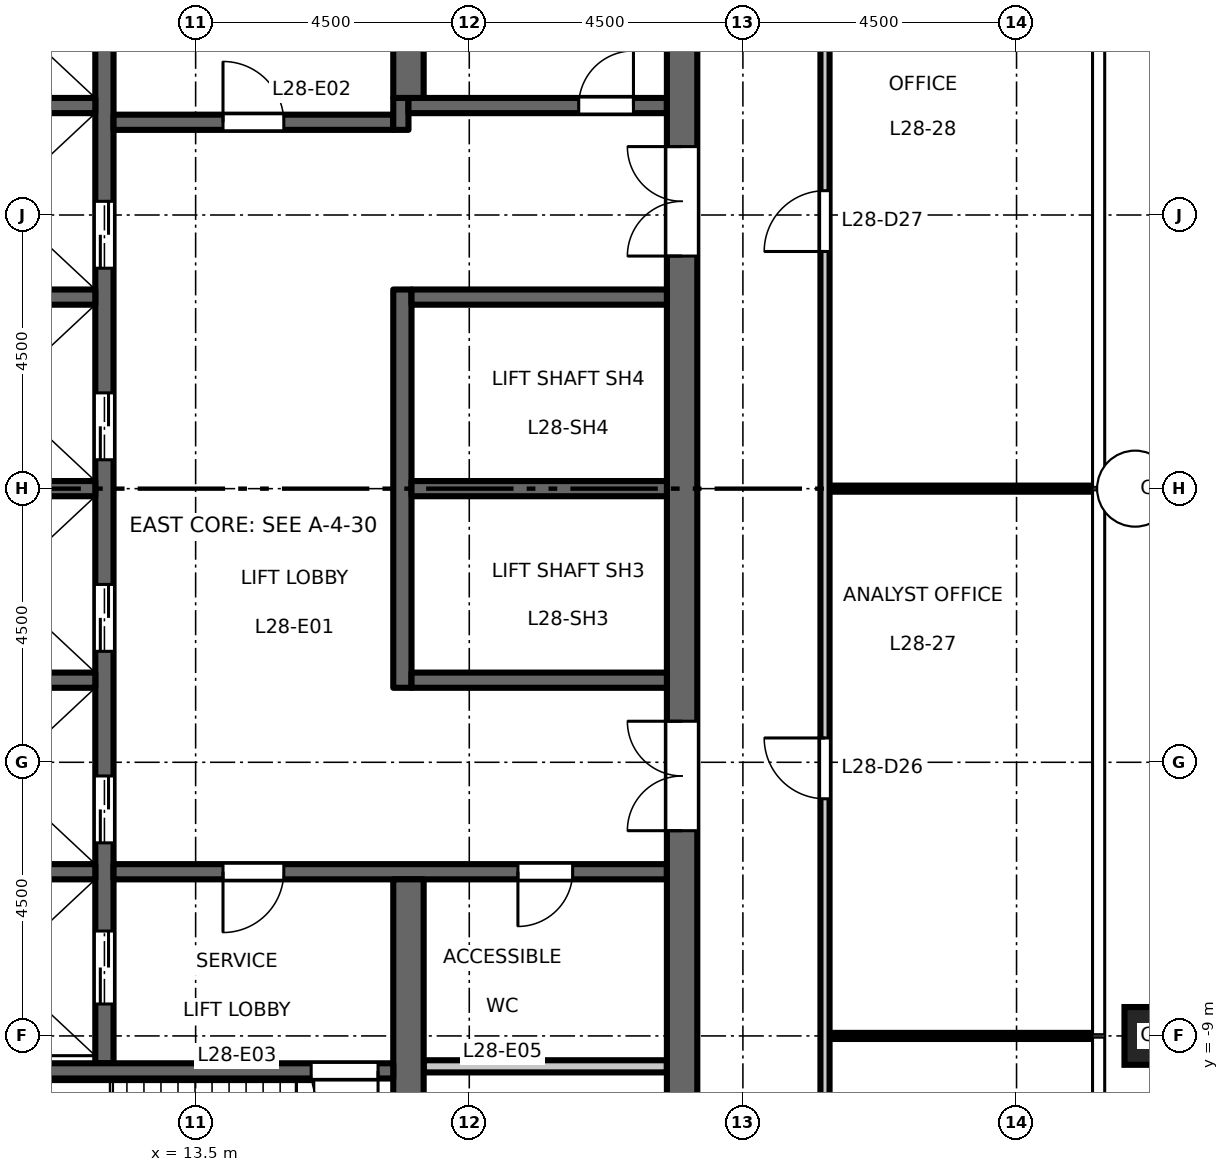
"""IFC4 building model, lengths in metres.
Left out: names, types, materials, properties, quantities, classifications, styles, units other than length and angle.
Written with IfcOpenShell. Run it as: python <this file> out.ifc"""

import sys

from ifc_helpers import new_model, si_unit, direction, frame, frame_2d, origin, origin_2d, place, context, subcontext, project, spatial, rectangle, hollow_rectangle, extrude, element, fill, save


model = new_model("IFC4")
c1 = context("Model", 3, precision=1e-05, world=origin(), true_north=direction((0.0, 1.0)))
c2 = subcontext(c1, "Body", "Model", "MODEL_VIEW")
j1 = project(units=[si_unit("LENGTHUNIT", "METRE"), si_unit("PLANEANGLEUNIT", "RADIAN")], contexts=[c1])
p1 = place(None, origin())
s1 = spatial("IfcSite", under=j1, at=p1, CompositionType="ELEMENT")
p2 = place(p1, origin())
s2 = spatial("IfcBuilding", under=s1, at=p2, CompositionType="ELEMENT")
p3 = place(p2, frame((0.0, 0.0, 131.7)))
s3 = spatial("IfcBuildingStorey", under=s2, at=p3, CompositionType="ELEMENT", Elevation=131.7)
for number, where, z_axis, x_axis in (
    (1, (29.25, -9.0, 0.0), (0.0, 0.0, 1.0), (1.0, 0.0, 0.0)),
    (2, (29.25, 0.0, 0.0), (0.0, 0.0, 1.0), (1.0, 0.0, 0.0)),
):
    element("IfcColumn", number, at=place(p3, frame(where, z_axis=z_axis, x_axis=x_axis)), inside=s3, PredefinedType="COLUMN", context=c2, shape_type="SweptSolid", body=[
        extrude(hollow_rectangle(XDim=0.95, YDim=0.95, WallThickness=0.055, at=origin_2d()), origin(), (0.0, 0.0, 1.0), 4.5),
    ])
p4 = place(p3, frame((12.0, -9.45, 0.0), z_axis=(0.0, 0.0, 1.0), x_axis=(0.0, 1.0, 0.0)))
e3 = element("IfcWall", 3, at=p4, inside=s3, PredefinedType="SHEAR", context=c2, shape_type="SweptSolid", body=[
    extrude(rectangle(XDim=18.9, YDim=0.3, at=frame_2d((9.45, 0.0))), origin(), (0.0, 0.0, 1.0), 4.35),
])
p5 = place(p4, frame((3.625, 0.0, 0.0)))
e4 = element("IfcOpeningElement", 4, at=p5, cuts=e3, PredefinedType="OPENING", context=c2, shape_type="SweptSolid", body=[
    extrude(rectangle(XDim=1.1, YDim=2.1, at=frame_2d((0.55, 1.05))), frame((0.0, 0.16, 0.0), z_axis=(0.0, -1.0, 0.0), x_axis=(1.0, 0.0, 0.0)), (0.0, 0.0, 1.0), 0.32),
])
p6 = place(p4, frame((6.775, 0.0, 0.0)))
e5 = element("IfcOpeningElement", 5, at=p6, cuts=e3, PredefinedType="OPENING", context=c2, shape_type="SweptSolid", body=[
    extrude(rectangle(XDim=1.1, YDim=2.1, at=frame_2d((0.55, 1.05))), frame((0.0, 0.16, 0.0), z_axis=(0.0, -1.0, 0.0), x_axis=(1.0, 0.0, 0.0)), (0.0, 0.0, 1.0), 0.32),
])
p7 = place(p4, frame((9.925, 0.0, 0.0)))
e6 = element("IfcOpeningElement", 6, at=p7, cuts=e3, PredefinedType="OPENING", context=c2, shape_type="SweptSolid", body=[
    extrude(rectangle(XDim=1.1, YDim=2.1, at=frame_2d((0.55, 1.05))), frame((0.0, 0.16, 0.0), z_axis=(0.0, -1.0, 0.0), x_axis=(1.0, 0.0, 0.0)), (0.0, 0.0, 1.0), 0.32),
])
p8 = place(p4, frame((13.075, 0.0, 0.0)))
e7 = element("IfcOpeningElement", 7, at=p8, cuts=e3, PredefinedType="OPENING", context=c2, shape_type="SweptSolid", body=[
    extrude(rectangle(XDim=1.1, YDim=2.1, at=frame_2d((0.55, 1.05))), frame((0.0, 0.16, 0.0), z_axis=(0.0, -1.0, 0.0), x_axis=(1.0, 0.0, 0.0)), (0.0, 0.0, 1.0), 0.32),
])
p9 = place(p4, frame((16.725, 0.0, 0.0)))
e8 = element("IfcOpeningElement", 8, at=p9, cuts=e3, PredefinedType="OPENING", context=c2, shape_type="SweptSolid", body=[
    extrude(rectangle(XDim=1.2, YDim=2.1, at=frame_2d((0.6, 1.05))), frame((0.0, 0.16, 0.0), z_axis=(0.0, -1.0, 0.0), x_axis=(1.0, 0.0, 0.0)), (0.0, 0.0, 1.0), 0.32),
])
p10 = place(p4, frame((0.975, 0.0, 0.0)))
e9 = element("IfcOpeningElement", 9, at=p10, cuts=e3, PredefinedType="OPENING", context=c2, shape_type="SweptSolid", body=[
    extrude(rectangle(XDim=1.2, YDim=2.1, at=frame_2d((0.6, 1.05))), frame((0.0, 0.16, 0.0), z_axis=(0.0, -1.0, 0.0), x_axis=(1.0, 0.0, 0.0)), (0.0, 0.0, 1.0), 0.32),
])
p11 = place(p3, frame((12.15, 6.025, 0.0), z_axis=(0.0, 0.0, 1.0), x_axis=(1.0, 0.0, 0.0)))
e10 = element("IfcWall", 10, at=p11, inside=s3, PredefinedType="SHEAR", context=c2, shape_type="SweptSolid", body=[
    extrude(rectangle(XDim=4.6, YDim=0.25, at=frame_2d((2.3, 0.0))), origin(), (0.0, 0.0, 1.0), 4.35),
])
p12 = place(p11, frame((1.8, 0.0, 0.0)))
e11 = element("IfcOpeningElement", 11, at=p12, cuts=e10, PredefinedType="OPENING", context=c2, shape_type="SweptSolid", body=[
    extrude(rectangle(XDim=1.0, YDim=2.1, at=frame_2d((0.5, 1.05))), frame((0.0, 0.135, 0.0), z_axis=(0.0, -1.0, 0.0), x_axis=(1.0, 0.0, 0.0)), (0.0, 0.0, 1.0), 0.27),
])
p13 = place(p3, frame((16.875, 5.9, 0.0), z_axis=(0.0, 0.0, 1.0), x_axis=(0.0, 1.0, 0.0)))
e12 = element("IfcWall", 12, at=p13, inside=s3, PredefinedType="SHEAR", context=c2, shape_type="SweptSolid", body=[
    extrude(rectangle(XDim=0.525, YDim=0.25, at=frame_2d((0.263, 0.0))), origin(), (0.0, 0.0, 1.0), 4.35),
])
p14 = place(p3, frame((17.0, 6.3, 0.0), z_axis=(0.0, 0.0, 1.0), x_axis=(1.0, 0.0, 0.0)))
e13 = element("IfcWall", 13, at=p14, inside=s3, PredefinedType="SHEAR", context=c2, shape_type="SweptSolid", body=[
    extrude(rectangle(XDim=4.25, YDim=0.25, at=frame_2d((2.125, 0.0))), origin(), (0.0, 0.0, 1.0), 4.35),
])
p15 = place(p14, frame((2.8, 0.0, 0.0)))
e14 = element("IfcOpeningElement", 14, at=p15, cuts=e13, PredefinedType="OPENING", context=c2, shape_type="SweptSolid", body=[
    extrude(rectangle(XDim=0.9, YDim=2.1, at=frame_2d((0.45, 1.05))), frame((0.0, 0.135, 0.0), z_axis=(0.0, -1.0, 0.0), x_axis=(1.0, 0.0, 0.0)), (0.0, 0.0, 1.0), 0.27),
])
p16 = place(p3, frame((12.15, -6.3, 0.0), z_axis=(0.0, 0.0, 1.0), x_axis=(1.0, 0.0, 0.0)))
e15 = element("IfcWall", 15, at=p16, inside=s3, PredefinedType="SHEAR", context=c2, shape_type="SweptSolid", body=[
    extrude(rectangle(XDim=9.1, YDim=0.25, at=frame_2d((4.55, 0.0))), origin(), (0.0, 0.0, 1.0), 4.35),
])
p17 = place(p16, frame((1.8, 0.0, 0.0)))
e16 = element("IfcOpeningElement", 16, at=p17, cuts=e15, PredefinedType="OPENING", context=c2, shape_type="SweptSolid", body=[
    extrude(rectangle(XDim=1.0, YDim=2.1, at=frame_2d((0.5, 1.05))), frame((0.0, 0.135, 0.0), z_axis=(0.0, -1.0, 0.0), x_axis=(1.0, 0.0, 0.0)), (0.0, 0.0, 1.0), 0.27),
])
p18 = place(p16, frame((6.65, 0.0, 0.0)))
e17 = element("IfcOpeningElement", 17, at=p18, cuts=e15, PredefinedType="OPENING", context=c2, shape_type="SweptSolid", body=[
    extrude(rectangle(XDim=0.9, YDim=2.1, at=frame_2d((0.45, 1.05))), frame((0.0, 0.135, 0.0), z_axis=(0.0, -1.0, 0.0), x_axis=(1.0, 0.0, 0.0)), (0.0, 0.0, 1.0), 0.27),
])
p19 = place(p3, frame((21.5, -13.0, 0.0), z_axis=(0.0, 0.0, 1.0), x_axis=(0.0, 1.0, 0.0)))
e18 = element("IfcWall", 18, at=p19, inside=s3, PredefinedType="SHEAR", context=c2, shape_type="SweptSolid", body=[
    extrude(rectangle(XDim=26.0, YDim=0.5, at=frame_2d((13.0, 0.0))), origin(), (0.0, 0.0, 1.0), 4.35),
])
p20 = place(p19, frame((16.825, 0.0, 0.0)))
e19 = element("IfcOpeningElement", 19, at=p20, cuts=e18, PredefinedType="OPENING", context=c2, shape_type="SweptSolid", body=[
    extrude(rectangle(XDim=1.8, YDim=2.1, at=frame_2d((0.9, 1.05))), frame((0.0, 0.26, 0.0), z_axis=(0.0, -1.0, 0.0), x_axis=(1.0, 0.0, 0.0)), (0.0, 0.0, 1.0), 0.52),
])
p21 = place(p19, frame((7.375, 0.0, 0.0)))
e20 = element("IfcOpeningElement", 20, at=p21, cuts=e18, PredefinedType="OPENING", context=c2, shape_type="SweptSolid", body=[
    extrude(rectangle(XDim=1.8, YDim=2.1, at=frame_2d((0.9, 1.05))), frame((0.0, 0.26, 0.0), z_axis=(0.0, -1.0, 0.0), x_axis=(1.0, 0.0, 0.0)), (0.0, 0.0, 1.0), 0.52),
])
p22 = place(p19, frame((1.3, 0.0, 0.0)))
e21 = element("IfcOpeningElement", 21, at=p22, cuts=e18, PredefinedType="OPENING", context=c2, shape_type="SweptSolid", body=[
    extrude(rectangle(XDim=0.9, YDim=2.1, at=frame_2d((0.45, 1.05))), frame((0.0, 0.26, 0.0), z_axis=(0.0, -1.0, 0.0), x_axis=(1.0, 0.0, 0.0)), (0.0, 0.0, 1.0), 0.52),
])
p23 = place(p3, frame((17.25, -9.5, 0.0), z_axis=(0.0, 0.0, 1.0), x_axis=(1.0, 0.0, 0.0)))
e22 = element("IfcWall", 22, at=p23, inside=s3, PredefinedType="PARTITIONING", context=c2, shape_type="SweptSolid", body=[
    extrude(rectangle(XDim=4.0, YDim=0.2, at=frame_2d((2.0, 0.0))), origin(), (0.0, 0.0, 1.0), 4.35),
])
p24 = place(p3, frame((16.9, -3.275, 0.0), z_axis=(0.0, 0.0, 1.0), x_axis=(0.0, 1.0, 0.0)))
e23 = element("IfcWall", 23, at=p24, inside=s3, PredefinedType="SHEAR", context=c2, shape_type="SweptSolid", body=[
    extrude(rectangle(XDim=6.55, YDim=0.3, at=frame_2d((3.275, 0.0))), origin(), (0.0, 0.0, 1.0), 4.35),
])
for number, where, z_axis, x_axis in (
    (24, (17.05, 0.0, 0.0), (0.0, 0.0, 1.0), (1.0, 0.0, 0.0)),
    (25, (17.05, 3.15, 0.0), (0.0, 0.0, 1.0), (1.0, 0.0, 0.0)),
    (26, (17.05, -3.15, 0.0), (0.0, 0.0, 1.0), (1.0, 0.0, 0.0)),
):
    element("IfcWall", number, at=place(p3, frame(where, z_axis=z_axis, x_axis=x_axis)), inside=s3, PredefinedType="SHEAR", context=c2, shape_type="SweptSolid", body=[
        extrude(rectangle(XDim=4.2, YDim=0.25, at=frame_2d((2.1, 0.0))), origin(), (0.0, 0.0, 1.0), 4.35),
    ])
for number, where, z_axis, x_axis in (
    (27, (17.0, 6.425, 0.0), (0.0, 0.0, 1.0), (0.0, 1.0, 0.0)),
    (28, (17.0, -13.0, 0.0), (0.0, 0.0, 1.0), (0.0, 1.0, 0.0)),
):
    element("IfcWall", number, at=place(p3, frame(where, z_axis=z_axis, x_axis=x_axis)), inside=s3, PredefinedType="SHEAR", context=c2, shape_type="SweptSolid", body=[
        extrude(rectangle(XDim=6.575, YDim=0.5, at=frame_2d((3.288, 0.0))), origin(), (0.0, 0.0, 1.0), 4.35),
    ])
for number, where, z_axis, x_axis in (
    (29, (8.75, 0.0, 0.0), (0.0, 0.0, 1.0), (1.0, 0.0, 0.0)),
    (30, (8.75, 3.15, 0.0), (0.0, 0.0, 1.0), (1.0, 0.0, 0.0)),
    (31, (8.75, 6.3, 0.0), (0.0, 0.0, 1.0), (1.0, 0.0, 0.0)),
    (32, (8.75, -3.15, 0.0), (0.0, 0.0, 1.0), (1.0, 0.0, 0.0)),
    (33, (8.75, -6.3, 0.0), (0.0, 0.0, 1.0), (1.0, 0.0, 0.0)),
):
    element("IfcWall", number, at=place(p3, frame(where, z_axis=z_axis, x_axis=x_axis)), inside=s3, PredefinedType="SHEAR", context=c2, shape_type="SweptSolid", body=[
        extrude(rectangle(XDim=3.1, YDim=0.25, at=frame_2d((1.55, 0.0))), origin(), (0.0, 0.0, 1.0), 4.35),
    ])
p25 = place(p3, frame((8.75, -9.575, 0.0), z_axis=(0.0, 0.0, 1.0), x_axis=(1.0, 0.0, 0.0)))
e34 = element("IfcWall", 34, at=p25, inside=s3, PredefinedType="SHEAR", context=c2, shape_type="SweptSolid", body=[
    extrude(rectangle(XDim=8.0, YDim=0.25, at=frame_2d((4.0, 0.0))), origin(), (0.0, 0.0, 1.0), 4.35),
])
p26 = place(p25, frame((6.65, 0.0, 0.0)))
e35 = element("IfcOpeningElement", 35, at=p26, cuts=e34, PredefinedType="OPENING", context=c2, shape_type="SweptSolid", body=[
    extrude(rectangle(XDim=1.1, YDim=2.1, at=frame_2d((0.55, 1.05))), frame((0.0, 0.135, 0.0), z_axis=(0.0, -1.0, 0.0), x_axis=(1.0, 0.0, 0.0)), (0.0, 0.0, 1.0), 0.27),
])
for number, where, z_axis, x_axis in (
    (36, (23.925, -9.0, 0.0), (0.0, 0.0, 1.0), (1.0, 0.0, 0.0)),
    (37, (23.925, 0.0, 0.0), (0.0, 0.0, 1.0), (1.0, 0.0, 0.0)),
):
    element("IfcWall", number, at=place(p3, frame(where, z_axis=z_axis, x_axis=x_axis)), inside=s3, PredefinedType="PARTITIONING", context=c2, shape_type="SweptSolid", body=[
        extrude(rectangle(XDim=4.335, YDim=0.1, at=frame_2d((2.167, 0.0))), origin(), (0.0, 0.0, 1.0), 4.35),
    ])
p27 = place(p3, frame((23.85, -18.925, 0.0), z_axis=(0.0, 0.0, 1.0), x_axis=(0.0, 1.0, 0.0)))
e38 = element("IfcWall", 38, at=p27, inside=s3, PredefinedType="PARTITIONING", context=c2, shape_type="SweptSolid", body=[
    extrude(rectangle(XDim=37.85, YDim=0.15, at=frame_2d((18.925, 0.0))), origin(), (0.0, 0.0, 1.0), 4.35),
])
p28 = place(p27, frame((4.325, 0.0, 0.0)))
e39 = element("IfcOpeningElement", 39, at=p28, cuts=e38, PredefinedType="OPENING", context=c2, shape_type="SweptSolid", body=[
    extrude(rectangle(XDim=1.0, YDim=2.1, at=frame_2d((0.5, 1.05))), frame((0.0, 0.085, 0.0), z_axis=(0.0, -1.0, 0.0), x_axis=(1.0, 0.0, 0.0)), (0.0, 0.0, 1.0), 0.17),
])
p29 = place(p27, frame((13.825, 0.0, 0.0)))
e40 = element("IfcOpeningElement", 40, at=p29, cuts=e38, PredefinedType="OPENING", context=c2, shape_type="SweptSolid", body=[
    extrude(rectangle(XDim=1.0, YDim=2.1, at=frame_2d((0.5, 1.05))), frame((0.0, 0.085, 0.0), z_axis=(0.0, -1.0, 0.0), x_axis=(1.0, 0.0, 0.0)), (0.0, 0.0, 1.0), 0.17),
])
p30 = place(p27, frame((22.825, 0.0, 0.0)))
e41 = element("IfcOpeningElement", 41, at=p30, cuts=e38, PredefinedType="OPENING", context=c2, shape_type="SweptSolid", body=[
    extrude(rectangle(XDim=1.0, YDim=2.1, at=frame_2d((0.5, 1.05))), frame((0.0, 0.085, 0.0), z_axis=(0.0, -1.0, 0.0), x_axis=(1.0, 0.0, 0.0)), (0.0, 0.0, 1.0), 0.17),
])
p31 = place(p27, frame((32.325, 0.0, 0.0)))
e42 = element("IfcOpeningElement", 42, at=p31, cuts=e38, PredefinedType="OPENING", context=c2, shape_type="SweptSolid", body=[
    extrude(rectangle(XDim=1.0, YDim=2.1, at=frame_2d((0.5, 1.05))), frame((0.0, 0.085, 0.0), z_axis=(0.0, -1.0, 0.0), x_axis=(1.0, 0.0, 0.0)), (0.0, 0.0, 1.0), 0.17),
])
p32 = place(p12, origin())
e43 = element("IfcDoor", 43, at=p32, inside=s3, OperationType="SINGLE_SWING_RIGHT", PredefinedType="DOOR", context=c2, shape_type="SweptSolid", body=[
    extrude(rectangle(XDim=1.0, YDim=2.1, at=frame_2d((0.5, 1.05))), frame((0.0, 0.025, 0.0), z_axis=(0.0, -1.0, 0.0), x_axis=(1.0, 0.0, 0.0)), (0.0, 0.0, 1.0), 0.05),
])
fill(e11, e43)
p33 = place(p17, origin())
e44 = element("IfcDoor", 44, at=p33, inside=s3, OperationType="SINGLE_SWING_LEFT", PredefinedType="DOOR", context=c2, shape_type="SweptSolid", body=[
    extrude(rectangle(XDim=1.0, YDim=2.1, at=frame_2d((0.5, 1.05))), frame((0.0, 0.025, 0.0), z_axis=(0.0, -1.0, 0.0), x_axis=(1.0, 0.0, 0.0)), (0.0, 0.0, 1.0), 0.05),
])
fill(e16, e44)
p34 = place(p26, origin())
e45 = element("IfcDoor", 45, at=p34, inside=s3, OperationType="SINGLE_SWING_RIGHT", PredefinedType="DOOR", context=c2, shape_type="SweptSolid", body=[
    extrude(rectangle(XDim=1.1, YDim=2.1, at=frame_2d((0.55, 1.05))), frame((0.0, 0.025, 0.0), z_axis=(0.0, -1.0, 0.0), x_axis=(1.0, 0.0, 0.0)), (0.0, 0.0, 1.0), 0.05),
])
fill(e35, e45)
p35 = place(p20, origin())
e46 = element("IfcDoor", 46, at=p35, inside=s3, OperationType="DOUBLE_DOOR_DOUBLE_SWING", PredefinedType="DOOR", context=c2, shape_type="SweptSolid", body=[
    extrude(rectangle(XDim=1.8, YDim=2.1, at=frame_2d((0.9, 1.05))), frame((0.0, 0.025, 0.0), z_axis=(0.0, -1.0, 0.0), x_axis=(1.0, 0.0, 0.0)), (0.0, 0.0, 1.0), 0.05),
])
fill(e19, e46)
p36 = place(p21, origin())
e47 = element("IfcDoor", 47, at=p36, inside=s3, OperationType="DOUBLE_DOOR_DOUBLE_SWING", PredefinedType="DOOR", context=c2, shape_type="SweptSolid", body=[
    extrude(rectangle(XDim=1.8, YDim=2.1, at=frame_2d((0.9, 1.05))), frame((0.0, 0.025, 0.0), z_axis=(0.0, -1.0, 0.0), x_axis=(1.0, 0.0, 0.0)), (0.0, 0.0, 1.0), 0.05),
])
fill(e20, e47)
p37 = place(p5, origin())
e48 = element("IfcDoor", 48, at=p37, inside=s3, OperationType="DOUBLE_DOOR_SLIDING", PredefinedType="DOOR", context=c2, shape_type="SweptSolid", body=[
    extrude(rectangle(XDim=1.1, YDim=2.1, at=frame_2d((0.55, 1.05))), frame((0.0, 0.025, 0.0), z_axis=(0.0, -1.0, 0.0), x_axis=(1.0, 0.0, 0.0)), (0.0, 0.0, 1.0), 0.05),
])
fill(e4, e48)
p38 = place(p6, origin())
e49 = element("IfcDoor", 49, at=p38, inside=s3, OperationType="DOUBLE_DOOR_SLIDING", PredefinedType="DOOR", context=c2, shape_type="SweptSolid", body=[
    extrude(rectangle(XDim=1.1, YDim=2.1, at=frame_2d((0.55, 1.05))), frame((0.0, 0.025, 0.0), z_axis=(0.0, -1.0, 0.0), x_axis=(1.0, 0.0, 0.0)), (0.0, 0.0, 1.0), 0.05),
])
fill(e5, e49)
p39 = place(p7, origin())
e50 = element("IfcDoor", 50, at=p39, inside=s3, OperationType="DOUBLE_DOOR_SLIDING", PredefinedType="DOOR", context=c2, shape_type="SweptSolid", body=[
    extrude(rectangle(XDim=1.1, YDim=2.1, at=frame_2d((0.55, 1.05))), frame((0.0, 0.025, 0.0), z_axis=(0.0, -1.0, 0.0), x_axis=(1.0, 0.0, 0.0)), (0.0, 0.0, 1.0), 0.05),
])
fill(e6, e50)
p40 = place(p8, origin())
e51 = element("IfcDoor", 51, at=p40, inside=s3, OperationType="DOUBLE_DOOR_SLIDING", PredefinedType="DOOR", context=c2, shape_type="SweptSolid", body=[
    extrude(rectangle(XDim=1.1, YDim=2.1, at=frame_2d((0.55, 1.05))), frame((0.0, 0.025, 0.0), z_axis=(0.0, -1.0, 0.0), x_axis=(1.0, 0.0, 0.0)), (0.0, 0.0, 1.0), 0.05),
])
fill(e7, e51)
p41 = place(p10, origin())
e52 = element("IfcDoor", 52, at=p41, inside=s3, OperationType="DOUBLE_DOOR_SLIDING", PredefinedType="DOOR", context=c2, shape_type="SweptSolid", body=[
    extrude(rectangle(XDim=1.2, YDim=2.1, at=frame_2d((0.6, 1.05))), frame((0.0, 0.025, 0.0), z_axis=(0.0, -1.0, 0.0), x_axis=(1.0, 0.0, 0.0)), (0.0, 0.0, 1.0), 0.05),
])
fill(e9, e52)
p42 = place(p15, origin())
e53 = element("IfcDoor", 53, at=p42, inside=s3, OperationType="SINGLE_SWING_LEFT", PredefinedType="DOOR", context=c2, shape_type="SweptSolid", body=[
    extrude(rectangle(XDim=0.9, YDim=2.1, at=frame_2d((0.45, 1.05))), frame((0.0, 0.025, 0.0), z_axis=(0.0, -1.0, 0.0), x_axis=(1.0, 0.0, 0.0)), (0.0, 0.0, 1.0), 0.05),
])
fill(e14, e53)
p43 = place(p18, origin())
e54 = element("IfcDoor", 54, at=p43, inside=s3, OperationType="SINGLE_SWING_LEFT", PredefinedType="DOOR", context=c2, shape_type="SweptSolid", body=[
    extrude(rectangle(XDim=0.9, YDim=2.1, at=frame_2d((0.45, 1.05))), frame((0.0, 0.025, 0.0), z_axis=(0.0, -1.0, 0.0), x_axis=(1.0, 0.0, 0.0)), (0.0, 0.0, 1.0), 0.05),
])
fill(e17, e54)
p44 = place(p29, origin())
e55 = element("IfcDoor", 55, at=p44, inside=s3, OperationType="SINGLE_SWING_RIGHT", PredefinedType="DOOR", context=c2, shape_type="SweptSolid", body=[
    extrude(rectangle(XDim=1.0, YDim=2.1, at=frame_2d((0.5, 1.05))), frame((0.0, 0.025, 0.0), z_axis=(0.0, -1.0, 0.0), x_axis=(1.0, 0.0, 0.0)), (0.0, 0.0, 1.0), 0.05),
])
fill(e40, e55)
p45 = place(p30, origin())
e56 = element("IfcDoor", 56, at=p45, inside=s3, OperationType="SINGLE_SWING_LEFT", PredefinedType="DOOR", context=c2, shape_type="SweptSolid", body=[
    extrude(rectangle(XDim=1.0, YDim=2.1, at=frame_2d((0.5, 1.05))), frame((0.0, 0.025, 0.0), z_axis=(0.0, -1.0, 0.0), x_axis=(1.0, 0.0, 0.0)), (0.0, 0.0, 1.0), 0.05),
])
fill(e41, e56)
save(model, sys.argv[1])
